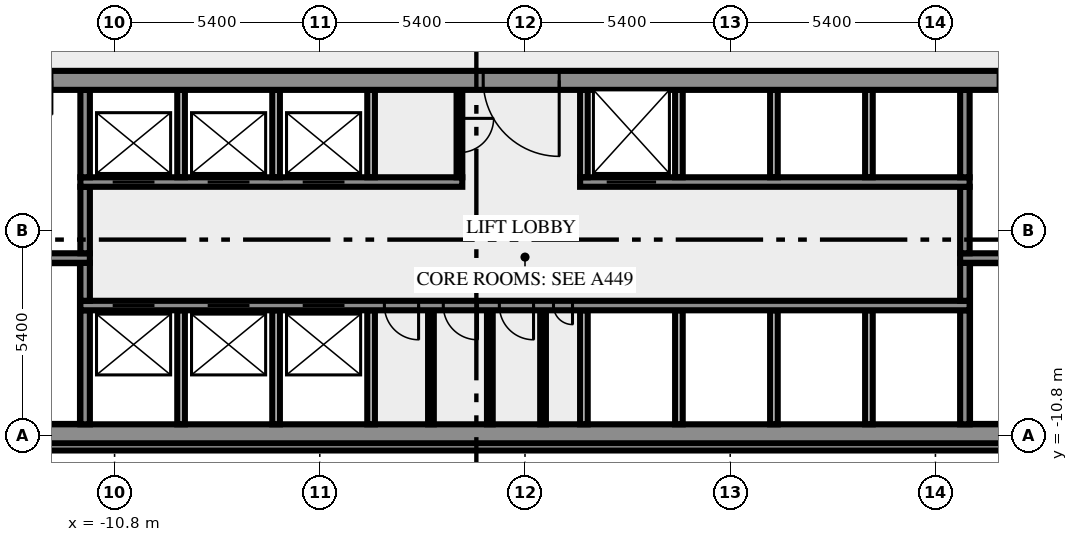
"""IFC4 building model, lengths in metres.
Left out: names, types, materials, properties, quantities, classifications, styles, units other than length and angle.
Written with IfcOpenShell. Run it as: python <this file> out.ifc"""

import sys

from ifc_helpers import new_model, si_unit, direction, frame, frame_2d, origin, place, context, subcontext, project, spatial, rectangle, extrude, element, fill, save


model = new_model("IFC4")
c1 = context("Model", 3, precision=1e-05, world=origin(), true_north=direction((0.0, 1.0)))
c2 = subcontext(c1, "Body", "Model", "MODEL_VIEW")
j1 = project(units=[si_unit("LENGTHUNIT", "METRE"), si_unit("PLANEANGLEUNIT", "RADIAN")], contexts=[c1])
p1 = place(None, origin())
s1 = spatial("IfcSite", under=j1, at=p1, CompositionType="ELEMENT")
p2 = place(p1, origin())
s2 = spatial("IfcBuilding", under=s1, at=p2, CompositionType="ELEMENT")
p3 = place(p2, frame((0.0, 0.0, 20.5)))
s3 = spatial("IfcBuildingStorey", under=s2, at=p3, CompositionType="ELEMENT", Elevation=20.5)
p4 = place(p3, frame((-17.444, -11.088, 0.0), z_axis=(0.0, 0.0, 1.0), x_axis=(1.0, 0.0, 0.0)))
e1 = element("IfcWall", 1, at=p4, inside=s3, PredefinedType="SOLIDWALL", context=c2, shape_type="SweptSolid", body=[
    extrude(rectangle(XDim=34.888, YDim=0.2, at=frame_2d((17.444, 0.0))), origin(), (0.0, 0.0, 1.0), 3.9),
])
p5 = place(p3, frame((-20.0, -10.75, 0.0), z_axis=(0.0, 0.0, 1.0), x_axis=(1.0, 0.0, 0.0)))
e2 = element("IfcWall", 2, at=p5, inside=s3, PredefinedType="SHEAR", context=c2, shape_type="SweptSolid", body=[
    extrude(rectangle(XDim=40.0, YDim=0.5, at=frame_2d((20.0, 0.0))), origin(), (0.0, 0.0, 1.0), 3.9),
])
p6 = place(p5, frame((0.8, 0.0, 1.0)))
e3 = element("IfcOpeningElement", 3, at=p6, cuts=e2, PredefinedType="OPENING", context=c2, shape_type="SweptSolid", body=[
    extrude(rectangle(XDim=1.2, YDim=1.2, at=frame_2d((0.6, 0.6))), frame((0.0, 0.26, 0.0), z_axis=(0.0, -1.0, 0.0), x_axis=(1.0, 0.0, 0.0)), (0.0, 0.0, 1.0), 0.52),
])
p7 = place(p5, frame((38.0, 0.0, 1.0)))
e4 = element("IfcOpeningElement", 4, at=p7, cuts=e2, PredefinedType="OPENING", context=c2, shape_type="SweptSolid", body=[
    extrude(rectangle(XDim=1.2, YDim=1.2, at=frame_2d((0.6, 0.6))), frame((0.0, 0.26, 0.0), z_axis=(0.0, -1.0, 0.0), x_axis=(1.0, 0.0, 0.0)), (0.0, 0.0, 1.0), 0.52),
])
p8 = place(p3, frame((-11.575, -10.5, 0.0), z_axis=(0.0, 0.0, 1.0), x_axis=(0.0, 1.0, 0.0)))
e5 = element("IfcWall", 5, at=p8, inside=s3, PredefinedType="SHEAR", context=c2, shape_type="SweptSolid", body=[
    extrude(rectangle(XDim=3.0, YDim=0.25, at=frame_2d((1.5, 0.0))), origin(), (0.0, 0.0, 1.0), 3.9),
])
for number, where, z_axis, x_axis in (
    (6, (-9.05, -10.5, 0.0), (0.0, 0.0, 1.0), (0.0, 1.0, 0.0)),
    (7, (-6.55, -10.5, 0.0), (0.0, 0.0, 1.0), (0.0, 1.0, 0.0)),
    (8, (-4.05, -10.5, 0.0), (0.0, 0.0, 1.0), (0.0, 1.0, 0.0)),
):
    element("IfcWall", number, at=place(p3, frame(where, z_axis=z_axis, x_axis=x_axis)), inside=s3, PredefinedType="SOLIDWALL", context=c2, shape_type="SweptSolid", body=[
        extrude(rectangle(XDim=3.0, YDim=0.2, at=frame_2d((1.5, 0.0))), origin(), (0.0, 0.0, 1.0), 3.9),
    ])
for number, where, z_axis, x_axis in (
    (9, (-2.475, -10.5, 0.0), (0.0, 0.0, 1.0), (0.0, 1.0, 0.0)),
    (10, (-0.925, -10.5, 0.0), (0.0, 0.0, 1.0), (0.0, 1.0, 0.0)),
    (11, (0.475, -10.5, 0.0), (0.0, 0.0, 1.0), (0.0, 1.0, 0.0)),
):
    element("IfcWall", number, at=place(p3, frame(where, z_axis=z_axis, x_axis=x_axis)), inside=s3, PredefinedType="PARTITIONING", context=c2, shape_type="SweptSolid", body=[
        extrude(rectangle(XDim=3.0, YDim=0.15, at=frame_2d((1.5, 0.0))), origin(), (0.0, 0.0, 1.0), 3.9),
    ])
for number, where, z_axis, x_axis in (
    (12, (1.55, -10.5, 0.0), (0.0, 0.0, 1.0), (0.0, 1.0, 0.0)),
    (13, (4.05, -10.5, 0.0), (0.0, 0.0, 1.0), (0.0, 1.0, 0.0)),
    (14, (6.55, -10.5, 0.0), (0.0, 0.0, 1.0), (0.0, 1.0, 0.0)),
    (15, (9.05, -10.5, 0.0), (0.0, 0.0, 1.0), (0.0, 1.0, 0.0)),
):
    element("IfcWall", number, at=place(p3, frame(where, z_axis=z_axis, x_axis=x_axis)), inside=s3, PredefinedType="SOLIDWALL", context=c2, shape_type="SweptSolid", body=[
        extrude(rectangle(XDim=3.0, YDim=0.2, at=frame_2d((1.5, 0.0))), origin(), (0.0, 0.0, 1.0), 3.9),
    ])
p9 = place(p3, frame((11.575, -10.5, 0.0), z_axis=(0.0, 0.0, 1.0), x_axis=(0.0, 1.0, 0.0)))
e16 = element("IfcWall", 16, at=p9, inside=s3, PredefinedType="SHEAR", context=c2, shape_type="SweptSolid", body=[
    extrude(rectangle(XDim=3.0, YDim=0.25, at=frame_2d((1.5, 0.0))), origin(), (0.0, 0.0, 1.0), 3.9),
])
p10 = place(p3, frame((11.7, -7.375, 0.0), z_axis=(0.0, 0.0, 1.0), x_axis=(-1.0, 0.0, 0.0)))
e17 = element("IfcWall", 17, at=p10, inside=s3, PredefinedType="SHEAR", context=c2, shape_type="SweptSolid", body=[
    extrude(rectangle(XDim=23.4, YDim=0.25, at=frame_2d((11.7, 0.0))), origin(), (0.0, 0.0, 1.0), 3.9),
])
p11 = place(p10, frame((21.45, 0.0, 0.0)))
e18 = element("IfcOpeningElement", 18, at=p11, cuts=e17, PredefinedType="OPENING", context=c2, shape_type="SweptSolid", body=[
    extrude(rectangle(XDim=1.1, YDim=2.1, at=frame_2d((0.55, 1.05))), frame((0.0, 0.135, 0.0), z_axis=(0.0, -1.0, 0.0), x_axis=(1.0, 0.0, 0.0)), (0.0, 0.0, 1.0), 0.27),
])
p12 = place(p10, frame((18.95, 0.0, 0.0)))
e19 = element("IfcOpeningElement", 19, at=p12, cuts=e17, PredefinedType="OPENING", context=c2, shape_type="SweptSolid", body=[
    extrude(rectangle(XDim=1.1, YDim=2.1, at=frame_2d((0.55, 1.05))), frame((0.0, 0.135, 0.0), z_axis=(0.0, -1.0, 0.0), x_axis=(1.0, 0.0, 0.0)), (0.0, 0.0, 1.0), 0.27),
])
p13 = place(p10, frame((16.45, 0.0, 0.0)))
e20 = element("IfcOpeningElement", 20, at=p13, cuts=e17, PredefinedType="OPENING", context=c2, shape_type="SweptSolid", body=[
    extrude(rectangle(XDim=1.1, YDim=2.1, at=frame_2d((0.55, 1.05))), frame((0.0, 0.135, 0.0), z_axis=(0.0, -1.0, 0.0), x_axis=(1.0, 0.0, 0.0)), (0.0, 0.0, 1.0), 0.27),
])
p14 = place(p10, frame((14.5, 0.0, 0.0)))
e21 = element("IfcOpeningElement", 21, at=p14, cuts=e17, PredefinedType="OPENING", context=c2, shape_type="SweptSolid", body=[
    extrude(rectangle(XDim=0.9, YDim=2.1, at=frame_2d((0.45, 1.05))), frame((0.0, 0.135, 0.0), z_axis=(0.0, -1.0, 0.0), x_axis=(1.0, 0.0, 0.0)), (0.0, 0.0, 1.0), 0.27),
])
p15 = place(p10, frame((12.95, 0.0, 0.0)))
e22 = element("IfcOpeningElement", 22, at=p15, cuts=e17, PredefinedType="OPENING", context=c2, shape_type="SweptSolid", body=[
    extrude(rectangle(XDim=0.9, YDim=2.1, at=frame_2d((0.45, 1.05))), frame((0.0, 0.135, 0.0), z_axis=(0.0, -1.0, 0.0), x_axis=(1.0, 0.0, 0.0)), (0.0, 0.0, 1.0), 0.27),
])
p16 = place(p10, frame((11.475, 0.0, 0.0)))
e23 = element("IfcOpeningElement", 23, at=p16, cuts=e17, PredefinedType="OPENING", context=c2, shape_type="SweptSolid", body=[
    extrude(rectangle(XDim=0.9, YDim=2.1, at=frame_2d((0.45, 1.05))), frame((0.0, 0.135, 0.0), z_axis=(0.0, -1.0, 0.0), x_axis=(1.0, 0.0, 0.0)), (0.0, 0.0, 1.0), 0.27),
])
p17 = place(p10, frame((10.45, 0.0, 0.0)))
e24 = element("IfcOpeningElement", 24, at=p17, cuts=e17, PredefinedType="OPENING", context=c2, shape_type="SweptSolid", body=[
    extrude(rectangle(XDim=0.5, YDim=2.1, at=frame_2d((0.25, 1.05))), frame((0.0, 0.135, 0.0), z_axis=(0.0, -1.0, 0.0), x_axis=(1.0, 0.0, 0.0)), (0.0, 0.0, 1.0), 0.27),
])
for number, where, z_axis, x_axis in (
    (25, (-11.575, -7.25, 0.0), (0.0, 0.0, 1.0), (0.0, 1.0, 0.0)),
    (26, (11.575, -7.25, 0.0), (0.0, 0.0, 1.0), (0.0, 1.0, 0.0)),
):
    element("IfcWall", number, at=place(p3, frame(where, z_axis=z_axis, x_axis=x_axis)), inside=s3, PredefinedType="SHEAR", context=c2, shape_type="SweptSolid", body=[
        extrude(rectangle(XDim=1.0, YDim=0.25, at=frame_2d((0.5, 0.0))), origin(), (0.0, 0.0, 1.0), 3.9),
    ])
p18 = place(p3, frame((-11.45, -6.125, 0.0), z_axis=(0.0, 0.0, 1.0), x_axis=(-1.0, 0.0, 0.0)))
e27 = element("IfcWall", 27, at=p18, inside=s3, PredefinedType="SHEAR", context=c2, shape_type="SweptSolid", body=[
    extrude(rectangle(XDim=8.05, YDim=0.25, at=frame_2d((4.025, 0.0))), origin(), (0.0, 0.0, 1.0), 3.9),
])
p19 = place(p18, frame((6.2, 0.0, 0.0)))
e28 = element("IfcOpeningElement", 28, at=p19, cuts=e27, PredefinedType="OPENING", context=c2, shape_type="SweptSolid", body=[
    extrude(rectangle(XDim=1.8, YDim=2.1, at=frame_2d((0.9, 1.05))), frame((0.0, 0.135, 0.0), z_axis=(0.0, -1.0, 0.0), x_axis=(1.0, 0.0, 0.0)), (0.0, 0.0, 1.0), 0.27),
])
p20 = place(p3, frame((19.5, -6.125, 0.0), z_axis=(0.0, 0.0, 1.0), x_axis=(-1.0, 0.0, 0.0)))
e29 = element("IfcWall", 29, at=p20, inside=s3, PredefinedType="SHEAR", context=c2, shape_type="SweptSolid", body=[
    extrude(rectangle(XDim=8.05, YDim=0.25, at=frame_2d((4.025, 0.0))), origin(), (0.0, 0.0, 1.0), 3.9),
])
p21 = place(p20, frame((0.05, 0.0, 0.0)))
e30 = element("IfcOpeningElement", 30, at=p21, cuts=e29, PredefinedType="OPENING", context=c2, shape_type="SweptSolid", body=[
    extrude(rectangle(XDim=1.8, YDim=2.1, at=frame_2d((0.9, 1.05))), frame((0.0, 0.135, 0.0), z_axis=(0.0, -1.0, 0.0), x_axis=(1.0, 0.0, 0.0)), (0.0, 0.0, 1.0), 0.27),
])
for number, where, z_axis, x_axis in (
    (31, (-11.575, -6.0, 0.0), (0.0, 0.0, 1.0), (0.0, 1.0, 0.0)),
    (32, (11.575, -6.0, 0.0), (0.0, 0.0, 1.0), (0.0, 1.0, 0.0)),
):
    element("IfcWall", number, at=place(p3, frame(where, z_axis=z_axis, x_axis=x_axis)), inside=s3, PredefinedType="SHEAR", context=c2, shape_type="SweptSolid", body=[
        extrude(rectangle(XDim=1.75, YDim=0.25, at=frame_2d((0.875, 0.0))), origin(), (0.0, 0.0, 1.0), 3.9),
    ])
p22 = place(p3, frame((-11.7, -4.125, 0.0), z_axis=(0.0, 0.0, 1.0), x_axis=(1.0, 0.0, 0.0)))
e33 = element("IfcWall", 33, at=p22, inside=s3, PredefinedType="SHEAR", context=c2, shape_type="SweptSolid", body=[
    extrude(rectangle(XDim=10.05, YDim=0.25, at=frame_2d((5.025, 0.0))), origin(), (0.0, 0.0, 1.0), 3.9),
])
p23 = place(p22, frame((0.85, 0.0, 0.0)))
e34 = element("IfcOpeningElement", 34, at=p23, cuts=e33, PredefinedType="OPENING", context=c2, shape_type="SweptSolid", body=[
    extrude(rectangle(XDim=1.1, YDim=2.1, at=frame_2d((0.55, 1.05))), frame((0.0, 0.135, 0.0), z_axis=(0.0, -1.0, 0.0), x_axis=(1.0, 0.0, 0.0)), (0.0, 0.0, 1.0), 0.27),
])
p24 = place(p22, frame((3.35, 0.0, 0.0)))
e35 = element("IfcOpeningElement", 35, at=p24, cuts=e33, PredefinedType="OPENING", context=c2, shape_type="SweptSolid", body=[
    extrude(rectangle(XDim=1.1, YDim=2.1, at=frame_2d((0.55, 1.05))), frame((0.0, 0.135, 0.0), z_axis=(0.0, -1.0, 0.0), x_axis=(1.0, 0.0, 0.0)), (0.0, 0.0, 1.0), 0.27),
])
p25 = place(p22, frame((5.85, 0.0, 0.0)))
e36 = element("IfcOpeningElement", 36, at=p25, cuts=e33, PredefinedType="OPENING", context=c2, shape_type="SweptSolid", body=[
    extrude(rectangle(XDim=1.1, YDim=2.1, at=frame_2d((0.55, 1.05))), frame((0.0, 0.135, 0.0), z_axis=(0.0, -1.0, 0.0), x_axis=(1.0, 0.0, 0.0)), (0.0, 0.0, 1.0), 0.27),
])
p26 = place(p3, frame((1.45, -4.125, 0.0), z_axis=(0.0, 0.0, 1.0), x_axis=(1.0, 0.0, 0.0)))
e37 = element("IfcWall", 37, at=p26, inside=s3, PredefinedType="SHEAR", context=c2, shape_type="SweptSolid", body=[
    extrude(rectangle(XDim=10.25, YDim=0.25, at=frame_2d((5.125, 0.0))), origin(), (0.0, 0.0, 1.0), 3.9),
])
p27 = place(p26, frame((0.7, 0.0, 0.0)))
e38 = element("IfcOpeningElement", 38, at=p27, cuts=e37, PredefinedType="OPENING", context=c2, shape_type="SweptSolid", body=[
    extrude(rectangle(XDim=1.3, YDim=2.1, at=frame_2d((0.65, 1.05))), frame((0.0, 0.135, 0.0), z_axis=(0.0, -1.0, 0.0), x_axis=(1.0, 0.0, 0.0)), (0.0, 0.0, 1.0), 0.27),
])
p28 = place(p3, frame((-11.575, -4.0, 0.0), z_axis=(0.0, 0.0, 1.0), x_axis=(0.0, 1.0, 0.0)))
e39 = element("IfcWall", 39, at=p28, inside=s3, PredefinedType="SHEAR", context=c2, shape_type="SweptSolid", body=[
    extrude(rectangle(XDim=2.3, YDim=0.25, at=frame_2d((1.15, 0.0))), origin(), (0.0, 0.0, 1.0), 3.9),
])
for number, where, z_axis, x_axis in (
    (40, (-9.05, -4.0, 0.0), (0.0, 0.0, 1.0), (0.0, 1.0, 0.0)),
    (41, (-6.55, -4.0, 0.0), (0.0, 0.0, 1.0), (0.0, 1.0, 0.0)),
    (42, (-4.05, -4.0, 0.0), (0.0, 0.0, 1.0), (0.0, 1.0, 0.0)),
):
    element("IfcWall", number, at=place(p3, frame(where, z_axis=z_axis, x_axis=x_axis)), inside=s3, PredefinedType="SOLIDWALL", context=c2, shape_type="SweptSolid", body=[
        extrude(rectangle(XDim=2.3, YDim=0.2, at=frame_2d((1.15, 0.0))), origin(), (0.0, 0.0, 1.0), 3.9),
    ])
p29 = place(p3, frame((-1.725, -1.7, 0.0), z_axis=(0.0, 0.0, 1.0), x_axis=(0.0, -1.0, 0.0)))
e43 = element("IfcWall", 43, at=p29, inside=s3, PredefinedType="PARTITIONING", context=c2, shape_type="SweptSolid", body=[
    extrude(rectangle(XDim=2.3, YDim=0.15, at=frame_2d((1.15, 0.0))), origin(), (0.0, 0.0, 1.0), 3.9),
])
p30 = place(p29, frame((0.75, 0.0, 0.0)))
e44 = element("IfcOpeningElement", 44, at=p30, cuts=e43, PredefinedType="OPENING", context=c2, shape_type="SweptSolid", body=[
    extrude(rectangle(XDim=0.9, YDim=2.1, at=frame_2d((0.45, 1.05))), frame((0.0, 0.085, 0.0), z_axis=(0.0, -1.0, 0.0), x_axis=(1.0, 0.0, 0.0)), (0.0, 0.0, 1.0), 0.17),
])
for number, where, z_axis, x_axis in (
    (45, (1.55, -4.0, 0.0), (0.0, 0.0, 1.0), (0.0, 1.0, 0.0)),
    (46, (4.05, -4.0, 0.0), (0.0, 0.0, 1.0), (0.0, 1.0, 0.0)),
    (47, (6.55, -4.0, 0.0), (0.0, 0.0, 1.0), (0.0, 1.0, 0.0)),
    (48, (9.05, -4.0, 0.0), (0.0, 0.0, 1.0), (0.0, 1.0, 0.0)),
):
    element("IfcWall", number, at=place(p3, frame(where, z_axis=z_axis, x_axis=x_axis)), inside=s3, PredefinedType="SOLIDWALL", context=c2, shape_type="SweptSolid", body=[
        extrude(rectangle(XDim=2.3, YDim=0.2, at=frame_2d((1.15, 0.0))), origin(), (0.0, 0.0, 1.0), 3.9),
    ])
p31 = place(p3, frame((11.575, -4.0, 0.0), z_axis=(0.0, 0.0, 1.0), x_axis=(0.0, 1.0, 0.0)))
e49 = element("IfcWall", 49, at=p31, inside=s3, PredefinedType="SHEAR", context=c2, shape_type="SweptSolid", body=[
    extrude(rectangle(XDim=2.3, YDim=0.25, at=frame_2d((1.15, 0.0))), origin(), (0.0, 0.0, 1.0), 3.9),
])
p32 = place(p3, frame((20.49, -1.45, 0.0), z_axis=(0.0, 0.0, 1.0), x_axis=(-1.0, 0.0, 0.0)))
e50 = element("IfcWall", 50, at=p32, inside=s3, PredefinedType="SHEAR", context=c2, shape_type="SweptSolid", body=[
    extrude(rectangle(XDim=40.98, YDim=0.5, at=frame_2d((20.49, 0.0))), origin(), (0.0, 0.0, 1.0), 3.9),
])
p33 = place(p32, frame((38.14, 0.0, 0.0)))
e51 = element("IfcOpeningElement", 51, at=p33, cuts=e50, PredefinedType="OPENING", context=c2, shape_type="SweptSolid", body=[
    extrude(rectangle(XDim=1.8, YDim=2.1, at=frame_2d((0.9, 1.05))), frame((0.0, 0.26, 0.0), z_axis=(0.0, -1.0, 0.0), x_axis=(1.0, 0.0, 0.0)), (0.0, 0.0, 1.0), 0.52),
])
p34 = place(p32, frame((36.728, 0.0, 0.0)))
e52 = element("IfcOpeningElement", 52, at=p34, cuts=e50, PredefinedType="OPENING", context=c2, shape_type="SweptSolid", body=[
    extrude(rectangle(XDim=0.8, YDim=2.1, at=frame_2d((0.4, 1.05))), frame((0.0, 0.26, 0.0), z_axis=(0.0, -1.0, 0.0), x_axis=(1.0, 0.0, 0.0)), (0.0, 0.0, 1.0), 0.52),
])
p35 = place(p32, frame((35.153, 0.0, 0.0)))
e53 = element("IfcOpeningElement", 53, at=p35, cuts=e50, PredefinedType="OPENING", context=c2, shape_type="SweptSolid", body=[
    extrude(rectangle(XDim=0.8, YDim=2.1, at=frame_2d((0.4, 1.05))), frame((0.0, 0.26, 0.0), z_axis=(0.0, -1.0, 0.0), x_axis=(1.0, 0.0, 0.0)), (0.0, 0.0, 1.0), 0.52),
])
p36 = place(p32, frame((32.94, 0.0, 0.0)))
e54 = element("IfcOpeningElement", 54, at=p36, cuts=e50, PredefinedType="OPENING", context=c2, shape_type="SweptSolid", body=[
    extrude(rectangle(XDim=0.9, YDim=2.1, at=frame_2d((0.45, 1.05))), frame((0.0, 0.26, 0.0), z_axis=(0.0, -1.0, 0.0), x_axis=(1.0, 0.0, 0.0)), (0.0, 0.0, 1.0), 0.52),
])
p37 = place(p32, frame((19.59, 0.0, 0.0)))
e55 = element("IfcOpeningElement", 55, at=p37, cuts=e50, PredefinedType="OPENING", context=c2, shape_type="SweptSolid", body=[
    extrude(rectangle(XDim=2.0, YDim=2.1, at=frame_2d((1.0, 1.05))), frame((0.0, 0.26, 0.0), z_axis=(0.0, -1.0, 0.0), x_axis=(1.0, 0.0, 0.0)), (0.0, 0.0, 1.0), 0.52),
])
p38 = place(p32, frame((7.14, 0.0, 0.0)))
e56 = element("IfcOpeningElement", 56, at=p38, cuts=e50, PredefinedType="OPENING", context=c2, shape_type="SweptSolid", body=[
    extrude(rectangle(XDim=0.9, YDim=2.1, at=frame_2d((0.45, 1.05))), frame((0.0, 0.26, 0.0), z_axis=(0.0, -1.0, 0.0), x_axis=(1.0, 0.0, 0.0)), (0.0, 0.0, 1.0), 0.52),
])
p39 = place(p32, frame((4.19, 0.0, 0.0)))
e57 = element("IfcOpeningElement", 57, at=p39, cuts=e50, PredefinedType="OPENING", context=c2, shape_type="SweptSolid", body=[
    extrude(rectangle(XDim=0.9, YDim=2.1, at=frame_2d((0.45, 1.05))), frame((0.0, 0.26, 0.0), z_axis=(0.0, -1.0, 0.0), x_axis=(1.0, 0.0, 0.0)), (0.0, 0.0, 1.0), 0.52),
])
p40 = place(p32, frame((1.04, 0.0, 0.0)))
e58 = element("IfcOpeningElement", 58, at=p40, cuts=e50, PredefinedType="OPENING", context=c2, shape_type="SweptSolid", body=[
    extrude(rectangle(XDim=1.8, YDim=2.1, at=frame_2d((0.9, 1.05))), frame((0.0, 0.26, 0.0), z_axis=(0.0, -1.0, 0.0), x_axis=(1.0, 0.0, 0.0)), (0.0, 0.0, 1.0), 0.52),
])
p41 = place(p11, origin())
e59 = element("IfcDoor", 59, at=p41, inside=s3, OperationType="DOUBLE_DOOR_SLIDING", PredefinedType="DOOR", context=c2, shape_type="SweptSolid", body=[
    extrude(rectangle(XDim=1.1, YDim=2.1, at=frame_2d((0.55, 1.05))), frame((0.0, 0.025, 0.0), z_axis=(0.0, -1.0, 0.0), x_axis=(1.0, 0.0, 0.0)), (0.0, 0.0, 1.0), 0.05),
])
fill(e18, e59)
p42 = place(p12, origin())
e60 = element("IfcDoor", 60, at=p42, inside=s3, OperationType="DOUBLE_DOOR_SLIDING", PredefinedType="DOOR", context=c2, shape_type="SweptSolid", body=[
    extrude(rectangle(XDim=1.1, YDim=2.1, at=frame_2d((0.55, 1.05))), frame((0.0, 0.025, 0.0), z_axis=(0.0, -1.0, 0.0), x_axis=(1.0, 0.0, 0.0)), (0.0, 0.0, 1.0), 0.05),
])
fill(e19, e60)
p43 = place(p13, origin())
e61 = element("IfcDoor", 61, at=p43, inside=s3, OperationType="DOUBLE_DOOR_SLIDING", PredefinedType="DOOR", context=c2, shape_type="SweptSolid", body=[
    extrude(rectangle(XDim=1.1, YDim=2.1, at=frame_2d((0.55, 1.05))), frame((0.0, 0.025, 0.0), z_axis=(0.0, -1.0, 0.0), x_axis=(1.0, 0.0, 0.0)), (0.0, 0.0, 1.0), 0.05),
])
fill(e20, e61)
p44 = place(p14, origin())
e62 = element("IfcDoor", 62, at=p44, inside=s3, OperationType="SINGLE_SWING_RIGHT", PredefinedType="DOOR", context=c2, shape_type="SweptSolid", body=[
    extrude(rectangle(XDim=0.9, YDim=2.1, at=frame_2d((0.45, 1.05))), frame((0.0, 0.025, 0.0), z_axis=(0.0, -1.0, 0.0), x_axis=(1.0, 0.0, 0.0)), (0.0, 0.0, 1.0), 0.05),
])
fill(e21, e62)
p45 = place(p15, origin())
e63 = element("IfcDoor", 63, at=p45, inside=s3, OperationType="SINGLE_SWING_RIGHT", PredefinedType="DOOR", context=c2, shape_type="SweptSolid", body=[
    extrude(rectangle(XDim=0.9, YDim=2.1, at=frame_2d((0.45, 1.05))), frame((0.0, 0.025, 0.0), z_axis=(0.0, -1.0, 0.0), x_axis=(1.0, 0.0, 0.0)), (0.0, 0.0, 1.0), 0.05),
])
fill(e22, e63)
p46 = place(p16, origin())
e64 = element("IfcDoor", 64, at=p46, inside=s3, OperationType="SINGLE_SWING_RIGHT", PredefinedType="DOOR", context=c2, shape_type="SweptSolid", body=[
    extrude(rectangle(XDim=0.9, YDim=2.1, at=frame_2d((0.45, 1.05))), frame((0.0, 0.025, 0.0), z_axis=(0.0, -1.0, 0.0), x_axis=(1.0, 0.0, 0.0)), (0.0, 0.0, 1.0), 0.05),
])
fill(e23, e64)
p47 = place(p17, origin())
e65 = element("IfcDoor", 65, at=p47, inside=s3, OperationType="SINGLE_SWING_LEFT", PredefinedType="DOOR", context=c2, shape_type="SweptSolid", body=[
    extrude(rectangle(XDim=0.5, YDim=2.1, at=frame_2d((0.25, 1.05))), frame((0.0, 0.025, 0.0), z_axis=(0.0, -1.0, 0.0), x_axis=(1.0, 0.0, 0.0)), (0.0, 0.0, 1.0), 0.05),
])
fill(e24, e65)
p48 = place(p23, origin())
e66 = element("IfcDoor", 66, at=p48, inside=s3, OperationType="DOUBLE_DOOR_SLIDING", PredefinedType="DOOR", context=c2, shape_type="SweptSolid", body=[
    extrude(rectangle(XDim=1.1, YDim=2.1, at=frame_2d((0.55, 1.05))), frame((0.0, 0.025, 0.0), z_axis=(0.0, -1.0, 0.0), x_axis=(1.0, 0.0, 0.0)), (0.0, 0.0, 1.0), 0.05),
])
fill(e34, e66)
p49 = place(p24, origin())
e67 = element("IfcDoor", 67, at=p49, inside=s3, OperationType="DOUBLE_DOOR_SLIDING", PredefinedType="DOOR", context=c2, shape_type="SweptSolid", body=[
    extrude(rectangle(XDim=1.1, YDim=2.1, at=frame_2d((0.55, 1.05))), frame((0.0, 0.025, 0.0), z_axis=(0.0, -1.0, 0.0), x_axis=(1.0, 0.0, 0.0)), (0.0, 0.0, 1.0), 0.05),
])
fill(e35, e67)
p50 = place(p25, origin())
e68 = element("IfcDoor", 68, at=p50, inside=s3, OperationType="DOUBLE_DOOR_SLIDING", PredefinedType="DOOR", context=c2, shape_type="SweptSolid", body=[
    extrude(rectangle(XDim=1.1, YDim=2.1, at=frame_2d((0.55, 1.05))), frame((0.0, 0.025, 0.0), z_axis=(0.0, -1.0, 0.0), x_axis=(1.0, 0.0, 0.0)), (0.0, 0.0, 1.0), 0.05),
])
fill(e36, e68)
p51 = place(p27, origin())
e69 = element("IfcDoor", 69, at=p51, inside=s3, OperationType="DOUBLE_DOOR_SLIDING", PredefinedType="DOOR", context=c2, shape_type="SweptSolid", body=[
    extrude(rectangle(XDim=1.3, YDim=2.1, at=frame_2d((0.65, 1.05))), frame((0.0, 0.025, 0.0), z_axis=(0.0, -1.0, 0.0), x_axis=(1.0, 0.0, 0.0)), (0.0, 0.0, 1.0), 0.05),
])
fill(e38, e69)
p52 = place(p30, origin())
e70 = element("IfcDoor", 70, at=p52, inside=s3, OperationType="SINGLE_SWING_RIGHT", PredefinedType="DOOR", context=c2, shape_type="SweptSolid", body=[
    extrude(rectangle(XDim=0.9, YDim=2.1, at=frame_2d((0.45, 1.05))), frame((0.0, 0.025, 0.0), z_axis=(0.0, -1.0, 0.0), x_axis=(1.0, 0.0, 0.0)), (0.0, 0.0, 1.0), 0.05),
])
fill(e44, e70)
p53 = place(p37, origin())
e71 = element("IfcDoor", 71, at=p53, inside=s3, OperationType="DOUBLE_DOOR_SINGLE_SWING", PredefinedType="DOOR", context=c2, shape_type="SweptSolid", body=[
    extrude(rectangle(XDim=2.0, YDim=2.1, at=frame_2d((1.0, 1.05))), frame((0.0, 0.025, 0.0), z_axis=(0.0, -1.0, 0.0), x_axis=(1.0, 0.0, 0.0)), (0.0, 0.0, 1.0), 0.05),
])
fill(e55, e71)
save(model, sys.argv[1])
